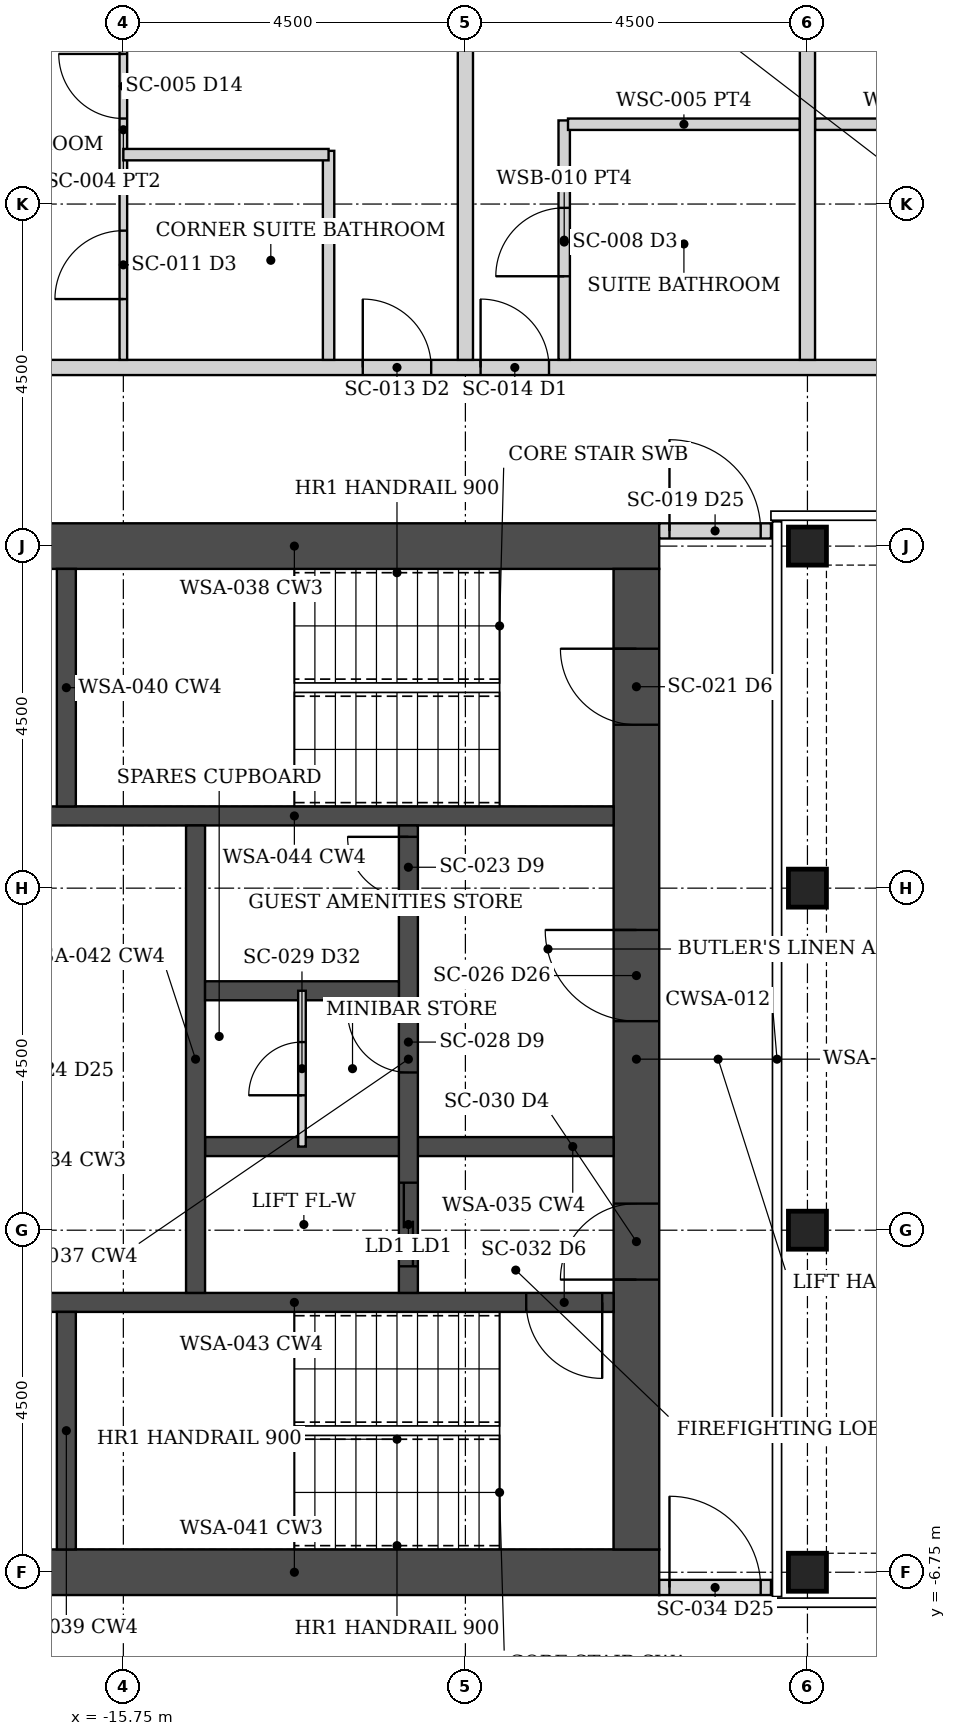
"""IFC4 building model, lengths in metres.
Left out: names, types, materials, properties, quantities, classifications, styles, units other than length and angle.
Written with IfcOpenShell. Run it as: python <this file> out.ifc"""

import sys

from ifc_helpers import new_model, si_unit, direction, frame, frame_2d, origin, origin_2d, place, context, subcontext, project, spatial, rectangle, hollow_rectangle, extrude, element, fill, save


model = new_model("IFC4")
c1 = context("Model", 3, precision=1e-05, world=origin(), true_north=direction((0.0, 1.0)))
c2 = subcontext(c1, "Body", "Model", "MODEL_VIEW")
j1 = project(units=[si_unit("LENGTHUNIT", "METRE"), si_unit("PLANEANGLEUNIT", "RADIAN")], contexts=[c1])
p1 = place(None, origin())
s1 = spatial("IfcSite", under=j1, at=p1, CompositionType="ELEMENT")
p2 = place(p1, origin())
s2 = spatial("IfcBuilding", under=s1, at=p2, CompositionType="ELEMENT")
p3 = place(p2, frame((0.0, 0.0, 223.3)))
s3 = spatial("IfcBuildingStorey", under=s2, at=p3, CompositionType="ELEMENT", Elevation=223.3)
for number, where, z_axis, x_axis in (
    (1, (-6.75, -6.75, 0.0), (0.0, 0.0, 1.0), (1.0, 0.0, 0.0)),
    (2, (-6.75, -2.25, 0.0), (0.0, 0.0, 1.0), (1.0, 0.0, 0.0)),
    (3, (-6.75, 2.25, 0.0), (0.0, 0.0, 1.0), (1.0, 0.0, 0.0)),
    (4, (-6.75, 6.75, 0.0), (0.0, 0.0, 1.0), (1.0, 0.0, 0.0)),
):
    element("IfcColumn", number, at=place(p3, frame(where, z_axis=z_axis, x_axis=x_axis)), inside=s3, PredefinedType="COLUMN", context=c2, shape_type="SweptSolid", body=[
        extrude(hollow_rectangle(XDim=0.5, YDim=0.5, WallThickness=0.03, at=origin_2d()), origin(), (0.0, 0.0, 1.0), 3.75),
    ])
for number, where, z_axis, x_axis in (
    (5, (-8.7, -6.75, 0.0), (0.0, 0.0, 1.0), (-1.0, 0.0, 0.0)),
    (6, (-8.7, 6.75, 0.0), (0.0, 0.0, 1.0), (-1.0, 0.0, 0.0)),
):
    element("IfcWall", number, at=place(p3, frame(where, z_axis=z_axis, x_axis=x_axis)), inside=s3, PredefinedType="SHEAR", context=c2, shape_type="SweptSolid", body=[
        extrude(rectangle(XDim=9.6, YDim=0.6, at=frame_2d((4.8, 0.0))), origin(), (0.0, 0.0, 1.0), 3.75),
    ])
p4 = place(p3, frame((-9.0, -6.45, 0.0), z_axis=(0.0, 0.0, 1.0), x_axis=(0.0, 1.0, 0.0)))
e7 = element("IfcWall", 7, at=p4, inside=s3, PredefinedType="SHEAR", context=c2, shape_type="SweptSolid", body=[
    extrude(rectangle(XDim=12.9, YDim=0.6, at=frame_2d((6.45, 0.0))), origin(), (0.0, 0.0, 1.0), 3.75),
])
p5 = place(p4, frame((3.55, 0.0, 0.0)))
e8 = element("IfcOpeningElement", 8, at=p5, cuts=e7, PredefinedType="OPENING", context=c2, shape_type="SweptSolid", body=[
    extrude(rectangle(XDim=1.0, YDim=2.1, at=frame_2d((0.5, 1.05))), frame((0.0, 0.31, 0.0), z_axis=(0.0, -1.0, 0.0), x_axis=(1.0, 0.0, 0.0)), (0.0, 0.0, 1.0), 0.62),
])
p6 = place(p4, frame((6.95, 0.0, 0.0)))
e9 = element("IfcOpeningElement", 9, at=p6, cuts=e7, PredefinedType="OPENING", context=c2, shape_type="SweptSolid", body=[
    extrude(rectangle(XDim=1.2, YDim=2.1, at=frame_2d((0.6, 1.05))), frame((0.0, 0.31, 0.0), z_axis=(0.0, -1.0, 0.0), x_axis=(1.0, 0.0, 0.0)), (0.0, 0.0, 1.0), 0.62),
])
p7 = place(p4, frame((10.85, 0.0, 0.0)))
e10 = element("IfcOpeningElement", 10, at=p7, cuts=e7, PredefinedType="OPENING", context=c2, shape_type="SweptSolid", body=[
    extrude(rectangle(XDim=1.0, YDim=2.1, at=frame_2d((0.5, 1.05))), frame((0.0, 0.31, 0.0), z_axis=(0.0, -1.0, 0.0), x_axis=(1.0, 0.0, 0.0)), (0.0, 0.0, 1.0), 0.62),
])
p8 = place(p3, frame((-9.3, -3.2, 0.0), z_axis=(0.0, 0.0, 1.0), x_axis=(-1.0, 0.0, 0.0)))
e11 = element("IfcWall", 11, at=p8, inside=s3, PredefinedType="SHEAR", context=c2, shape_type="SweptSolid", body=[
    extrude(rectangle(XDim=8.4, YDim=0.25, at=frame_2d((4.2, 0.0))), origin(), (0.0, 0.0, 1.0), 3.75),
])
p9 = place(p8, frame((0.15, 0.0, 0.0)))
e12 = element("IfcOpeningElement", 12, at=p9, cuts=e11, PredefinedType="OPENING", context=c2, shape_type="SweptSolid", body=[
    extrude(rectangle(XDim=1.0, YDim=2.1, at=frame_2d((0.5, 1.05))), frame((0.0, 0.135, 0.0), z_axis=(0.0, -1.0, 0.0), x_axis=(1.0, 0.0, 0.0)), (0.0, 0.0, 1.0), 0.27),
])
p10 = place(p3, frame((-9.3, 3.2, 0.0), z_axis=(0.0, 0.0, 1.0), x_axis=(-1.0, 0.0, 0.0)))
e13 = element("IfcWall", 13, at=p10, inside=s3, PredefinedType="SHEAR", context=c2, shape_type="SweptSolid", body=[
    extrude(rectangle(XDim=8.4, YDim=0.25, at=frame_2d((4.2, 0.0))), origin(), (0.0, 0.0, 1.0), 3.75),
])
for number, where, z_axis, x_axis in (
    (14, (-16.5, -6.45, 0.0), (0.0, 0.0, 1.0), (0.0, 1.0, 0.0)),
    (15, (-16.5, 3.325, 0.0), (0.0, 0.0, 1.0), (0.0, 1.0, 0.0)),
):
    element("IfcWall", number, at=place(p3, frame(where, z_axis=z_axis, x_axis=x_axis)), inside=s3, PredefinedType="SHEAR", context=c2, shape_type="SweptSolid", body=[
        extrude(rectangle(XDim=3.125, YDim=0.25, at=frame_2d((1.562, 0.0))), origin(), (0.0, 0.0, 1.0), 3.75),
    ])
p11 = place(p3, frame((-9.3, -1.15, 0.0), z_axis=(0.0, 0.0, 1.0), x_axis=(-1.0, 0.0, 0.0)))
e16 = element("IfcWall", 16, at=p11, inside=s3, PredefinedType="SHEAR", context=c2, shape_type="SweptSolid", body=[
    extrude(rectangle(XDim=5.375, YDim=0.25, at=frame_2d((2.688, 0.0))), origin(), (0.0, 0.0, 1.0), 3.75),
])
p12 = place(p3, frame((-12.0, -3.075, 0.0), z_axis=(0.0, 0.0, 1.0), x_axis=(0.0, 1.0, 0.0)))
e17 = element("IfcWall", 17, at=p12, inside=s3, PredefinedType="SHEAR", context=c2, shape_type="SweptSolid", body=[
    extrude(rectangle(XDim=6.15, YDim=0.25, at=frame_2d((3.075, 0.0))), origin(), (0.0, 0.0, 1.0), 3.75),
])
p13 = place(p12, frame((2.9, 0.0, 0.0)))
e18 = element("IfcOpeningElement", 18, at=p13, cuts=e17, PredefinedType="OPENING", context=c2, shape_type="SweptSolid", body=[
    extrude(rectangle(XDim=0.8, YDim=2.1, at=frame_2d((0.4, 1.05))), frame((0.0, 0.135, 0.0), z_axis=(0.0, -1.0, 0.0), x_axis=(1.0, 0.0, 0.0)), (0.0, 0.0, 1.0), 0.27),
])
p14 = place(p12, frame((5.2, 0.0, 0.0)))
e19 = element("IfcOpeningElement", 19, at=p14, cuts=e17, PredefinedType="OPENING", context=c2, shape_type="SweptSolid", body=[
    extrude(rectangle(XDim=0.8, YDim=2.1, at=frame_2d((0.4, 1.05))), frame((0.0, 0.135, 0.0), z_axis=(0.0, -1.0, 0.0), x_axis=(1.0, 0.0, 0.0)), (0.0, 0.0, 1.0), 0.27),
])
p15 = place(p12, frame((0.35, 0.0, 0.0)))
e20 = element("IfcOpeningElement", 20, at=p15, cuts=e17, PredefinedType="OPENING", context=c2, shape_type="SweptSolid", body=[
    extrude(rectangle(XDim=1.1, YDim=2.1, at=frame_2d((0.55, 1.05))), frame((0.0, 0.135, 0.0), z_axis=(0.0, -1.0, 0.0), x_axis=(1.0, 0.0, 0.0)), (0.0, 0.0, 1.0), 0.27),
])
p16 = place(p3, frame((-14.8, -3.075, 0.0), z_axis=(0.0, 0.0, 1.0), x_axis=(0.0, 1.0, 0.0)))
e21 = element("IfcWall", 21, at=p16, inside=s3, PredefinedType="SHEAR", context=c2, shape_type="SweptSolid", body=[
    extrude(rectangle(XDim=6.15, YDim=0.25, at=frame_2d((3.075, 0.0))), origin(), (0.0, 0.0, 1.0), 3.75),
])
p17 = place(p3, frame((-12.125, 0.9, 0.0), z_axis=(0.0, 0.0, 1.0), x_axis=(-1.0, 0.0, 0.0)))
e22 = element("IfcWall", 22, at=p17, inside=s3, PredefinedType="SHEAR", context=c2, shape_type="SweptSolid", body=[
    extrude(rectangle(XDim=2.55, YDim=0.25, at=frame_2d((1.275, 0.0))), origin(), (0.0, 0.0, 1.0), 3.75),
])
p18 = place(p3, frame((-8.7, 6.95, 0.0), z_axis=(0.0, 0.0, 1.0), x_axis=(1.0, 0.0, 0.0)))
e23 = element("IfcWall", 23, at=p18, inside=s3, PredefinedType="PARTITIONING", context=c2, shape_type="SweptSolid", body=[
    extrude(rectangle(XDim=1.47, YDim=0.2, at=frame_2d((0.735, 0.0))), origin(), (0.0, 0.0, 1.0), 2.629),
])
p19 = place(p18, frame((0.135, 0.0, 0.0)))
e24 = element("IfcOpeningElement", 24, at=p19, cuts=e23, PredefinedType="OPENING", context=c2, shape_type="SweptSolid", body=[
    extrude(rectangle(XDim=1.2, YDim=2.1, at=frame_2d((0.6, 1.05))), frame((0.0, 0.11, 0.0), z_axis=(0.0, -1.0, 0.0), x_axis=(1.0, 0.0, 0.0)), (0.0, 0.0, 1.0), 0.22),
])
p20 = place(p3, frame((-8.7, -6.95, 0.0), z_axis=(0.0, 0.0, 1.0), x_axis=(1.0, 0.0, 0.0)))
e25 = element("IfcWall", 25, at=p20, inside=s3, PredefinedType="PARTITIONING", context=c2, shape_type="SweptSolid", body=[
    extrude(rectangle(XDim=1.47, YDim=0.2, at=frame_2d((0.735, 0.0))), origin(), (0.0, 0.0, 1.0), 2.629),
])
p21 = place(p20, frame((0.135, 0.0, 0.0)))
e26 = element("IfcOpeningElement", 26, at=p21, cuts=e25, PredefinedType="OPENING", context=c2, shape_type="SweptSolid", body=[
    extrude(rectangle(XDim=1.2, YDim=2.1, at=frame_2d((0.6, 1.05))), frame((0.0, 0.11, 0.0), z_axis=(0.0, -1.0, 0.0), x_axis=(1.0, 0.0, 0.0)), (0.0, 0.0, 1.0), 0.22),
])
p22 = place(p3, frame((-20.05, 9.1, 0.0), z_axis=(0.0, 0.0, 1.0), x_axis=(1.0, 0.0, 0.0)))
e27 = element("IfcWall", 27, at=p22, inside=s3, PredefinedType="PARTITIONING", context=c2, shape_type="SweptSolid", body=[
    extrude(rectangle(XDim=40.1, YDim=0.2, at=frame_2d((20.05, 0.0))), origin(), (0.0, 0.0, 1.0), 2.629),
])
p23 = place(p22, frame((9.0, 0.0, 0.0)))
e28 = element("IfcOpeningElement", 28, at=p23, cuts=e27, PredefinedType="OPENING", context=c2, shape_type="SweptSolid", body=[
    extrude(rectangle(XDim=0.9, YDim=2.1, at=frame_2d((0.45, 1.05))), frame((0.0, 0.11, 0.0), z_axis=(0.0, -1.0, 0.0), x_axis=(1.0, 0.0, 0.0)), (0.0, 0.0, 1.0), 0.22),
])
p24 = place(p22, frame((16.7, 0.0, 0.0)))
e29 = element("IfcOpeningElement", 29, at=p24, cuts=e27, PredefinedType="OPENING", context=c2, shape_type="SweptSolid", body=[
    extrude(rectangle(XDim=0.9, YDim=2.1, at=frame_2d((0.45, 1.05))), frame((0.0, 0.11, 0.0), z_axis=(0.0, -1.0, 0.0), x_axis=(1.0, 0.0, 0.0)), (0.0, 0.0, 1.0), 0.22),
])
p25 = place(p22, frame((18.0, 0.0, 0.0)))
e30 = element("IfcOpeningElement", 30, at=p25, cuts=e27, PredefinedType="OPENING", context=c2, shape_type="SweptSolid", body=[
    extrude(rectangle(XDim=0.9, YDim=2.1, at=frame_2d((0.45, 1.05))), frame((0.0, 0.11, 0.0), z_axis=(0.0, -1.0, 0.0), x_axis=(1.0, 0.0, 0.0)), (0.0, 0.0, 1.0), 0.22),
])
p26 = place(p22, frame((22.6, 0.0, 0.0)))
e31 = element("IfcOpeningElement", 31, at=p26, cuts=e27, PredefinedType="OPENING", context=c2, shape_type="SweptSolid", body=[
    extrude(rectangle(XDim=0.9, YDim=2.1, at=frame_2d((0.45, 1.05))), frame((0.0, 0.11, 0.0), z_axis=(0.0, -1.0, 0.0), x_axis=(1.0, 0.0, 0.0)), (0.0, 0.0, 1.0), 0.22),
])
p27 = place(p22, frame((31.75, 0.0, 0.0)))
e32 = element("IfcOpeningElement", 32, at=p27, cuts=e27, PredefinedType="OPENING", context=c2, shape_type="SweptSolid", body=[
    extrude(rectangle(XDim=0.9, YDim=2.1, at=frame_2d((0.45, 1.05))), frame((0.0, 0.11, 0.0), z_axis=(0.0, -1.0, 0.0), x_axis=(1.0, 0.0, 0.0)), (0.0, 0.0, 1.0), 0.22),
])
p28 = place(p22, frame((7.45, 0.0, 0.0)))
e33 = element("IfcOpeningElement", 33, at=p28, cuts=e27, PredefinedType="OPENING", context=c2, shape_type="SweptSolid", body=[
    extrude(rectangle(XDim=0.9, YDim=2.1, at=frame_2d((0.45, 1.05))), frame((0.0, 0.11, 0.0), z_axis=(0.0, -1.0, 0.0), x_axis=(1.0, 0.0, 0.0)), (0.0, 0.0, 1.0), 0.22),
])
p29 = place(p3, frame((-9.95, 9.2, 0.0), z_axis=(0.0, 0.0, 1.0), x_axis=(0.0, 1.0, 0.0)))
e34 = element("IfcWall", 34, at=p29, inside=s3, PredefinedType="PARTITIONING", context=c2, shape_type="SweptSolid", body=[
    extrude(rectangle(XDim=3.15, YDim=0.15, at=frame_2d((1.575, 0.0))), origin(), (0.0, 0.0, 1.0), 2.629),
])
p30 = place(p29, frame((1.1, 0.0, 0.0)))
e35 = element("IfcOpeningElement", 35, at=p30, cuts=e34, PredefinedType="OPENING", context=c2, shape_type="SweptSolid", body=[
    extrude(rectangle(XDim=0.9, YDim=2.1, at=frame_2d((0.45, 1.05))), frame((0.0, 0.085, 0.0), z_axis=(0.0, -1.0, 0.0), x_axis=(1.0, 0.0, 0.0)), (0.0, 0.0, 1.0), 0.17),
])
for number, where, z_axis, x_axis in (
    (36, (-9.9, 12.3, 0.0), (0.0, 0.0, 1.0), (1.0, 0.0, 0.0)),
    (37, (-6.65, 12.3, 0.0), (0.0, 0.0, 1.0), (1.0, 0.0, 0.0)),
):
    element("IfcWall", number, at=place(p3, frame(where, z_axis=z_axis, x_axis=x_axis)), inside=s3, PredefinedType="PARTITIONING", context=c2, shape_type="SweptSolid", body=[
        extrude(rectangle(XDim=3.05, YDim=0.15, at=frame_2d((1.525, 0.0))), origin(), (0.0, 0.0, 1.0), 2.629),
    ])
for number, where, z_axis, x_axis in (
    (38, (-11.25, 9.2, 0.0), (0.0, 0.0, 1.0), (0.0, 1.0, 0.0)),
    (39, (-6.75, 9.2, 0.0), (0.0, 0.0, 1.0), (0.0, 1.0, 0.0)),
):
    element("IfcWall", number, at=place(p3, frame(where, z_axis=z_axis, x_axis=x_axis)), inside=s3, PredefinedType="PARTITIONING", context=c2, shape_type="SweptSolid", body=[
        extrude(rectangle(XDim=10.7, YDim=0.2, at=frame_2d((5.35, 0.0))), origin(), (0.0, 0.0, 1.0), 2.629),
    ])
p31 = place(p3, frame((-15.75, 9.2, 0.0), z_axis=(0.0, 0.0, 1.0), x_axis=(0.0, 1.0, 0.0)))
e40 = element("IfcWall", 40, at=p31, inside=s3, PredefinedType="PARTITIONING", context=c2, shape_type="SweptSolid", body=[
    extrude(rectangle(XDim=6.055, YDim=0.1, at=frame_2d((3.027, 0.0))), origin(), (0.0, 0.0, 1.0), 2.629),
])
p32 = place(p31, frame((3.175, 0.0, 0.0)))
e41 = element("IfcOpeningElement", 41, at=p32, cuts=e40, PredefinedType="OPENING", context=c2, shape_type="SweptSolid", body=[
    extrude(rectangle(XDim=0.85, YDim=2.1, at=frame_2d((0.425, 1.05))), frame((0.0, 0.06, 0.0), z_axis=(0.0, -1.0, 0.0), x_axis=(1.0, 0.0, 0.0)), (0.0, 0.0, 1.0), 0.12),
])
p33 = place(p31, frame((0.8, 0.0, 0.0)))
e42 = element("IfcOpeningElement", 42, at=p33, cuts=e40, PredefinedType="OPENING", context=c2, shape_type="SweptSolid", body=[
    extrude(rectangle(XDim=0.9, YDim=2.1, at=frame_2d((0.45, 1.05))), frame((0.0, 0.06, 0.0), z_axis=(0.0, -1.0, 0.0), x_axis=(1.0, 0.0, 0.0)), (0.0, 0.0, 1.0), 0.12),
])
p34 = place(p3, frame((-13.05, 9.2, 0.0), z_axis=(0.0, 0.0, 1.0), x_axis=(0.0, 1.0, 0.0)))
e43 = element("IfcWall", 43, at=p34, inside=s3, PredefinedType="PARTITIONING", context=c2, shape_type="SweptSolid", body=[
    extrude(rectangle(XDim=2.75, YDim=0.15, at=frame_2d((1.375, 0.0))), origin(), (0.0, 0.0, 1.0), 2.629),
])
p35 = place(p3, frame((-15.75, 11.9, 0.0), z_axis=(0.0, 0.0, 1.0), x_axis=(1.0, 0.0, 0.0)))
e44 = element("IfcWall", 44, at=p35, inside=s3, PredefinedType="PARTITIONING", context=c2, shape_type="SweptSolid", body=[
    extrude(rectangle(XDim=2.7, YDim=0.15, at=frame_2d((1.35, 0.0))), origin(), (0.0, 0.0, 1.0), 2.629),
])
p36 = place(p3, frame((-13.4, -1.15, 0.0), z_axis=(0.0, 0.0, 1.0), x_axis=(0.0, 1.0, 0.0)))
e45 = element("IfcWall", 45, at=p36, inside=s3, PredefinedType="PARTITIONING", context=c2, shape_type="SweptSolid", body=[
    extrude(rectangle(XDim=2.05, YDim=0.1, at=frame_2d((1.025, 0.0))), origin(), (0.0, 0.0, 1.0), 2.629),
])
p37 = place(p36, frame((0.675, 0.0, 0.0)))
e46 = element("IfcOpeningElement", 46, at=p37, cuts=e45, PredefinedType="OPENING", context=c2, shape_type="SweptSolid", body=[
    extrude(rectangle(XDim=0.7, YDim=2.1, at=frame_2d((0.35, 1.05))), frame((0.0, 0.06, 0.0), z_axis=(0.0, -1.0, 0.0), x_axis=(1.0, 0.0, 0.0)), (0.0, 0.0, 1.0), 0.12),
])
p38 = place(p19, origin())
e47 = element("IfcDoor", 47, at=p38, inside=s3, OperationType="DOUBLE_DOOR_DOUBLE_SWING", PredefinedType="DOOR", context=c2, shape_type="SweptSolid", body=[
    extrude(rectangle(XDim=1.2, YDim=2.1, at=frame_2d((0.6, 1.05))), frame((0.0, 0.025, 0.0), z_axis=(0.0, -1.0, 0.0), x_axis=(1.0, 0.0, 0.0)), (0.0, 0.0, 1.0), 0.05),
])
fill(e24, e47)
p39 = place(p21, origin())
e48 = element("IfcDoor", 48, at=p39, inside=s3, OperationType="DOUBLE_DOOR_DOUBLE_SWING", PredefinedType="DOOR", context=c2, shape_type="SweptSolid", body=[
    extrude(rectangle(XDim=1.2, YDim=2.1, at=frame_2d((0.6, 1.05))), frame((0.0, 0.025, 0.0), z_axis=(0.0, -1.0, 0.0), x_axis=(1.0, 0.0, 0.0)), (0.0, 0.0, 1.0), 0.05),
])
fill(e26, e48)
p40 = place(p23, origin())
e49 = element("IfcDoor", 49, at=p40, inside=s3, OperationType="SINGLE_SWING_LEFT", PredefinedType="DOOR", context=c2, shape_type="SweptSolid", body=[
    extrude(rectangle(XDim=0.9, YDim=2.1, at=frame_2d((0.45, 1.05))), frame((0.0, 0.025, 0.0), z_axis=(0.0, -1.0, 0.0), x_axis=(1.0, 0.0, 0.0)), (0.0, 0.0, 1.0), 0.05),
])
fill(e28, e49)
p41 = place(p30, origin())
e50 = element("IfcDoor", 50, at=p41, inside=s3, OperationType="SINGLE_SWING_LEFT", PredefinedType="DOOR", context=c2, shape_type="SweptSolid", body=[
    extrude(rectangle(XDim=0.9, YDim=2.1, at=frame_2d((0.45, 1.05))), frame((0.0, 0.025, 0.0), z_axis=(0.0, -1.0, 0.0), x_axis=(1.0, 0.0, 0.0)), (0.0, 0.0, 1.0), 0.05),
])
fill(e35, e50)
p42 = place(p28, origin())
e51 = element("IfcDoor", 51, at=p42, inside=s3, OperationType="SINGLE_SWING_LEFT", PredefinedType="DOOR", context=c2, shape_type="SweptSolid", body=[
    extrude(rectangle(XDim=0.9, YDim=2.1, at=frame_2d((0.45, 1.05))), frame((0.0, 0.025, 0.0), z_axis=(0.0, -1.0, 0.0), x_axis=(1.0, 0.0, 0.0)), (0.0, 0.0, 1.0), 0.05),
])
fill(e33, e51)
p43 = place(p32, origin())
e52 = element("IfcDoor", 52, at=p43, inside=s3, OperationType="SINGLE_SWING_RIGHT", PredefinedType="DOOR", context=c2, shape_type="SweptSolid", body=[
    extrude(rectangle(XDim=0.85, YDim=2.1, at=frame_2d((0.425, 1.05))), frame((0.0, 0.025, 0.0), z_axis=(0.0, -1.0, 0.0), x_axis=(1.0, 0.0, 0.0)), (0.0, 0.0, 1.0), 0.05),
])
fill(e41, e52)
p44 = place(p33, origin())
e53 = element("IfcDoor", 53, at=p44, inside=s3, OperationType="SINGLE_SWING_LEFT", PredefinedType="DOOR", context=c2, shape_type="SweptSolid", body=[
    extrude(rectangle(XDim=0.9, YDim=2.1, at=frame_2d((0.45, 1.05))), frame((0.0, 0.025, 0.0), z_axis=(0.0, -1.0, 0.0), x_axis=(1.0, 0.0, 0.0)), (0.0, 0.0, 1.0), 0.05),
])
fill(e42, e53)
p45 = place(p5, origin())
e54 = element("IfcDoor", 54, at=p45, inside=s3, OperationType="SINGLE_SWING_LEFT", PredefinedType="DOOR", context=c2, shape_type="SweptSolid", body=[
    extrude(rectangle(XDim=1.0, YDim=2.1, at=frame_2d((0.5, 1.05))), frame((0.0, 0.025, 0.0), z_axis=(0.0, -1.0, 0.0), x_axis=(1.0, 0.0, 0.0)), (0.0, 0.0, 1.0), 0.05),
])
fill(e8, e54)
p46 = place(p9, origin())
e55 = element("IfcDoor", 55, at=p46, inside=s3, OperationType="SINGLE_SWING_LEFT", PredefinedType="DOOR", context=c2, shape_type="SweptSolid", body=[
    extrude(rectangle(XDim=1.0, YDim=2.1, at=frame_2d((0.5, 1.05))), frame((0.0, 0.025, 0.0), z_axis=(0.0, -1.0, 0.0), x_axis=(1.0, 0.0, 0.0)), (0.0, 0.0, 1.0), 0.05),
])
fill(e12, e55)
p47 = place(p6, origin())
e56 = element("IfcDoor", 56, at=p47, inside=s3, OperationType="SINGLE_SWING_RIGHT", PredefinedType="DOOR", context=c2, shape_type="SweptSolid", body=[
    extrude(rectangle(XDim=1.2, YDim=2.1, at=frame_2d((0.6, 1.05))), frame((0.0, 0.025, 0.0), z_axis=(0.0, -1.0, 0.0), x_axis=(1.0, 0.0, 0.0)), (0.0, 0.0, 1.0), 0.05),
])
fill(e9, e56)
p48 = place(p37, origin())
e57 = element("IfcDoor", 57, at=p48, inside=s3, OperationType="SINGLE_SWING_LEFT", PredefinedType="DOOR", context=c2, shape_type="SweptSolid", body=[
    extrude(rectangle(XDim=0.7, YDim=2.1, at=frame_2d((0.35, 1.05))), frame((0.0, 0.025, 0.0), z_axis=(0.0, -1.0, 0.0), x_axis=(1.0, 0.0, 0.0)), (0.0, 0.0, 1.0), 0.05),
])
fill(e46, e57)
p49 = place(p13, origin())
e58 = element("IfcDoor", 58, at=p49, inside=s3, OperationType="SINGLE_SWING_RIGHT", PredefinedType="DOOR", context=c2, shape_type="SweptSolid", body=[
    extrude(rectangle(XDim=0.8, YDim=2.1, at=frame_2d((0.4, 1.05))), frame((0.0, 0.025, 0.0), z_axis=(0.0, -1.0, 0.0), x_axis=(1.0, 0.0, 0.0)), (0.0, 0.0, 1.0), 0.05),
])
fill(e18, e58)
p50 = place(p14, origin())
e59 = element("IfcDoor", 59, at=p50, inside=s3, OperationType="SINGLE_SWING_RIGHT", PredefinedType="DOOR", context=c2, shape_type="SweptSolid", body=[
    extrude(rectangle(XDim=0.8, YDim=2.1, at=frame_2d((0.4, 1.05))), frame((0.0, 0.025, 0.0), z_axis=(0.0, -1.0, 0.0), x_axis=(1.0, 0.0, 0.0)), (0.0, 0.0, 1.0), 0.05),
])
fill(e19, e59)
p51 = place(p7, origin())
e60 = element("IfcDoor", 60, at=p51, inside=s3, OperationType="SINGLE_SWING_RIGHT", PredefinedType="DOOR", context=c2, shape_type="SweptSolid", body=[
    extrude(rectangle(XDim=1.0, YDim=2.1, at=frame_2d((0.5, 1.05))), frame((0.0, 0.025, 0.0), z_axis=(0.0, -1.0, 0.0), x_axis=(1.0, 0.0, 0.0)), (0.0, 0.0, 1.0), 0.05),
])
fill(e10, e60)
p52 = place(p15, origin())
e61 = element("IfcDoor", 61, at=p52, inside=s3, OperationType="DOUBLE_DOOR_SLIDING", PredefinedType="DOOR", context=c2, shape_type="SweptSolid", body=[
    extrude(rectangle(XDim=1.1, YDim=2.1, at=frame_2d((0.55, 1.05))), frame((0.0, 0.025, 0.0), z_axis=(0.0, -1.0, 0.0), x_axis=(1.0, 0.0, 0.0)), (0.0, 0.0, 1.0), 0.05),
])
fill(e20, e61)
save(model, sys.argv[1])
